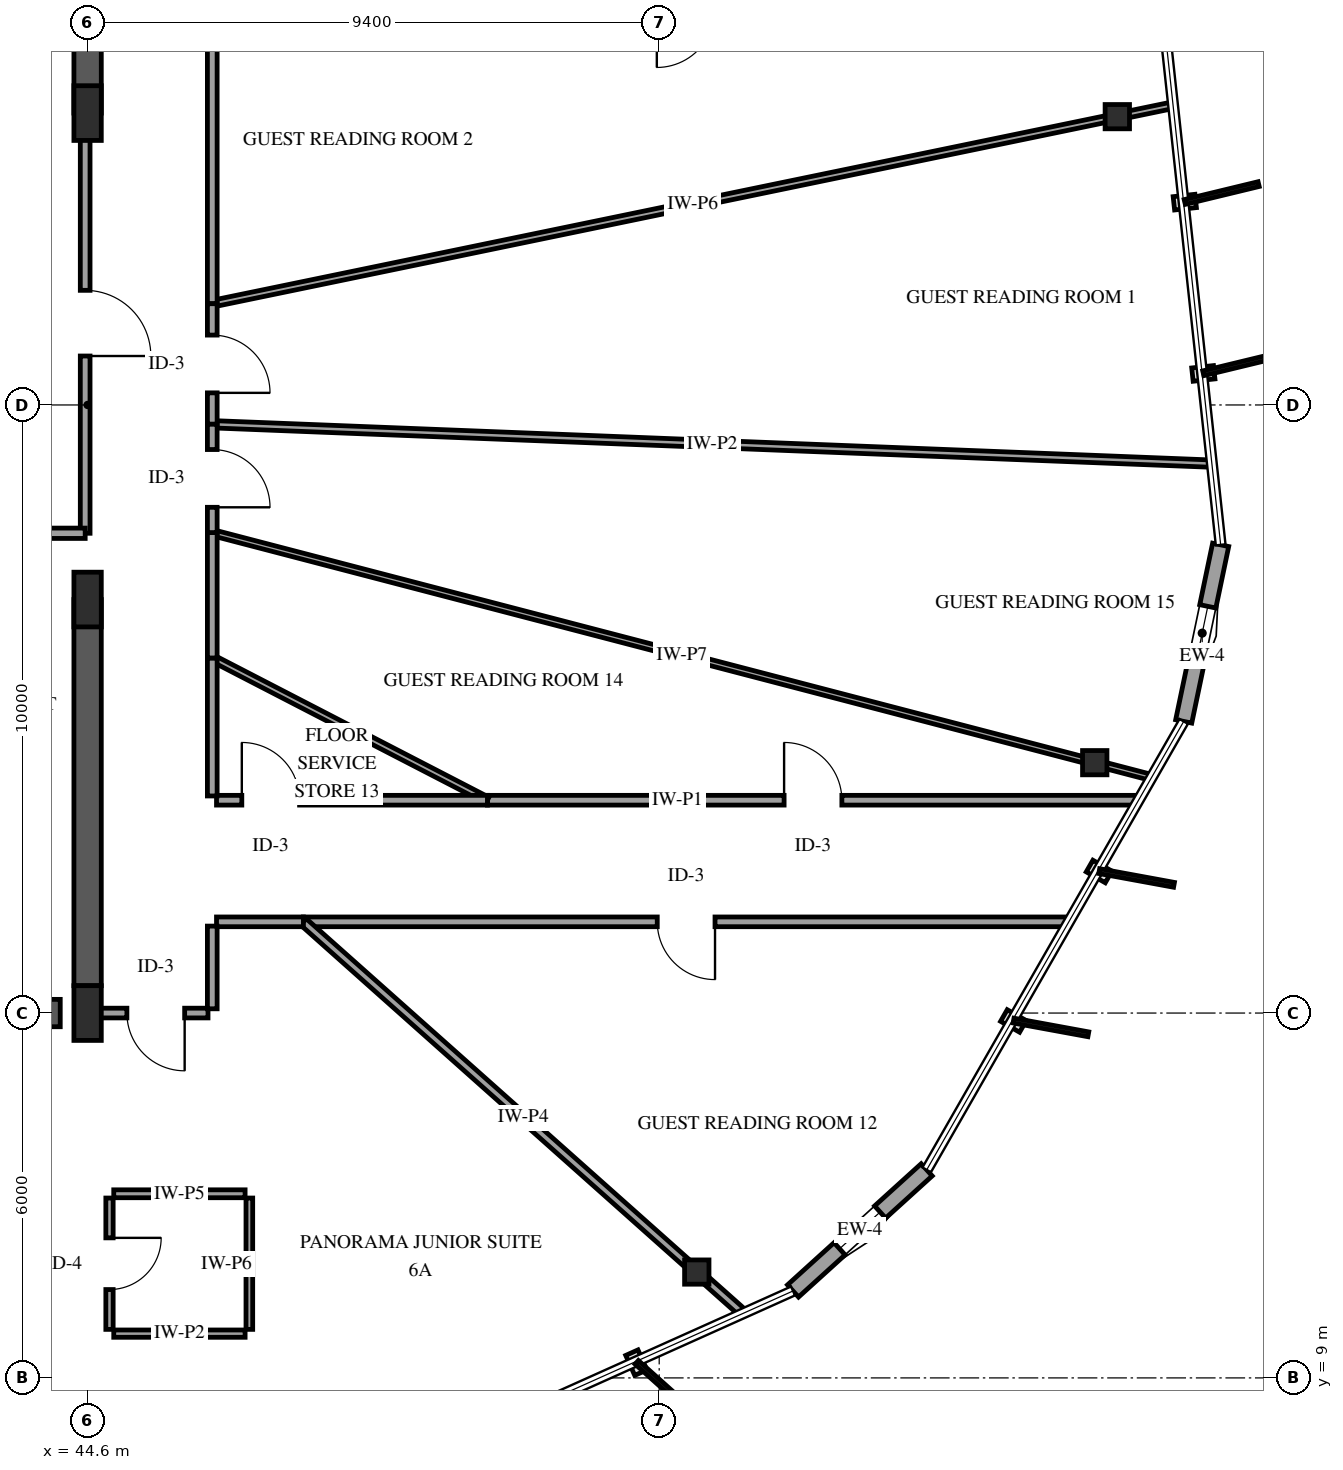
"""IFC4 building model, lengths in metres.
Left out: names, types, materials, properties, quantities, classifications, styles, units other than length and angle.
Written with IfcOpenShell. Run it as: python <this file> out.ifc"""

import sys

from ifc_helpers import new_model, si_unit, direction, frame, frame_2d, origin, origin_2d, place, context, subcontext, project, spatial, rectangle, i_section, extrude, element, fill, save


model = new_model("IFC4")
c1 = context("Model", 3, precision=1e-05, world=origin(), true_north=direction((0.0, 1.0)))
c2 = subcontext(c1, "Body", "Model", "MODEL_VIEW")
j1 = project(units=[si_unit("LENGTHUNIT", "METRE"), si_unit("PLANEANGLEUNIT", "RADIAN")], contexts=[c1])
p1 = place(None, origin())
s1 = spatial("IfcSite", under=j1, at=p1, CompositionType="ELEMENT")
p2 = place(p1, origin())
s2 = spatial("IfcBuilding", under=s1, at=p2, CompositionType="ELEMENT")
p3 = place(p2, frame((0.0, 0.0, 253.75)))
s3 = spatial("IfcBuildingStorey", under=s2, at=p3, CompositionType="ELEMENT", Elevation=253.75)
p4 = place(p3, frame((41.3, 15.0, 0.0), z_axis=(0.0, 0.0, 1.0), x_axis=(1.0, 0.0, 0.0)))
e1 = element("IfcWall", 1, at=p4, inside=s3, PredefinedType="SHEAR", context=c2, shape_type="SweptSolid", body=[
    extrude(rectangle(XDim=2.85, YDim=0.45, at=frame_2d((1.425, 0.0))), origin(), (0.0, 0.0, 1.0), 3.75),
])
p5 = place(p3, frame((44.6, 15.45, 0.0), z_axis=(0.0, 0.0, 1.0), x_axis=(0.0, 1.0, 0.0)))
e2 = element("IfcWall", 2, at=p5, inside=s3, PredefinedType="SHEAR", context=c2, shape_type="SweptSolid", body=[
    extrude(rectangle(XDim=6.35, YDim=0.45, at=frame_2d((3.175, 0.0))), origin(), (0.0, 0.0, 1.0), 3.75),
])
p6 = place(p3, frame((44.6, 29.8, 0.0), z_axis=(0.0, 0.0, 1.0), x_axis=(0.0, 1.0, 0.0)))
e3 = element("IfcWall", 3, at=p6, inside=s3, PredefinedType="SHEAR", context=c2, shape_type="SweptSolid", body=[
    extrude(rectangle(XDim=4.75, YDim=0.45, at=frame_2d((2.375, 0.0))), origin(), (0.0, 0.0, 1.0), 3.75),
])
for number, where, z_axis, x_axis in (
    (4, (44.6, 15.0, 0.0), (0.0, 0.0, 1.0), (1.0, 0.0, 0.0)),
    (5, (44.6, 21.8, 0.0), (0.0, 0.0, 1.0), (1.0, 0.0, 0.0)),
    (6, (44.6, 29.8, 0.0), (0.0, 0.0, 1.0), (1.0, 0.0, 0.0)),
):
    element("IfcColumn", number, at=place(p3, frame(where, z_axis=z_axis, x_axis=x_axis)), inside=s3, PredefinedType="PILASTER", context=c2, shape_type="SweptSolid", body=[
        extrude(rectangle(XDim=0.45, YDim=0.9, at=origin_2d()), origin(), (0.0, 0.0, 1.0), 3.75),
    ])
for number, where, z_axis, x_axis in (
    (7, (61.534, 29.741, 0.0), (0.0, 0.0, 1.0), (1.0, 0.0, 0.0)),
    (8, (54.618, 10.74, 0.0), (0.0, 0.0, 1.0), (1.0, 0.0, 0.0)),
    (9, (61.163, 19.117, 0.0), (0.0, 0.0, 1.0), (1.0, 0.0, 0.0)),
):
    element("IfcColumn", number, at=place(p3, frame(where, z_axis=z_axis, x_axis=x_axis)), inside=s3, PredefinedType="COLUMN", context=c2, shape_type="SweptSolid", body=[
        extrude(i_section(OverallWidth=0.401, OverallDepth=0.399, WebThickness=0.025, FlangeThickness=0.04, FilletRadius=0.038, at=origin_2d()), origin(), (0.0, 0.0, 1.0), 3.75),
    ])
p7 = place(p3, frame((56.201, 10.43, 0.0), z_axis=(0.0, 0.0, 1.0), x_axis=(0.741022782564, 0.671479884822, 0.0)))
e10 = element("IfcWall", 10, at=p7, inside=s3, PredefinedType="SOLIDWALL", context=c2, shape_type="SweptSolid", body=[
    extrude(rectangle(XDim=2.967, YDim=0.27, at=frame_2d((1.483, 0.0))), origin(), (0.0, 0.0, 1.0), 2.829),
])
p8 = place(p7, frame((1.033, 0.0, 0.75)))
e11 = element("IfcOpeningElement", 11, at=p8, cuts=e10, PredefinedType="OPENING", context=c2, shape_type="SweptSolid", body=[
    extrude(rectangle(XDim=0.9, YDim=1.5, at=frame_2d((0.45, 0.75))), frame((0.0, 0.145, 0.0), z_axis=(0.0, -1.0, 0.0), x_axis=(1.0, 0.0, 0.0)), (0.0, 0.0, 1.0), 0.29),
])
p9 = place(p3, frame((62.626, 19.796, 0.0), z_axis=(0.0, 0.0, 1.0), x_axis=(0.204828317867, 0.978797915915, 0.0)))
e12 = element("IfcWall", 12, at=p9, inside=s3, PredefinedType="SOLIDWALL", context=c2, shape_type="SweptSolid", body=[
    extrude(rectangle(XDim=2.967, YDim=0.27, at=frame_2d((1.483, 0.0))), origin(), (0.0, 0.0, 1.0), 2.829),
])
p10 = place(p9, frame((1.033, 0.0, 0.75)))
e13 = element("IfcOpeningElement", 13, at=p10, cuts=e12, PredefinedType="OPENING", context=c2, shape_type="SweptSolid", body=[
    extrude(rectangle(XDim=0.9, YDim=1.5, at=frame_2d((0.45, 0.75))), frame((0.0, 0.145, 0.0), z_axis=(0.0, -1.0, 0.0), x_axis=(1.0, 0.0, 0.0)), (0.0, 0.0, 1.0), 0.29),
])
p11 = place(p3, frame((63.089, 24.035, 0.0), z_axis=(0.0, 0.0, 1.0), x_axis=(-0.999223553945, 0.039399102038, 0.0)))
e14 = element("IfcWall", 14, at=p11, inside=s3, PredefinedType="PARTITIONING", context=c2, shape_type="SweptSolid", body=[
    extrude(rectangle(XDim=16.452, YDim=0.12, at=frame_2d((8.226, 0.0))), origin(), (0.0, 0.0, 1.0), 3.45),
])
p12 = place(p3, frame((46.65, 26.665, 0.0), z_axis=(0.0, 0.0, 1.0), x_axis=(0.979310600043, 0.202362913212, 0.0)))
e15 = element("IfcWall", 15, at=p12, inside=s3, PredefinedType="PARTITIONING", context=c2, shape_type="SweptSolid", body=[
    extrude(rectangle(XDim=16.134, YDim=0.11, at=frame_2d((8.067, 0.0))), origin(), (0.0, 0.0, 1.0), 2.745),
])
p13 = place(p3, frame((46.65, 22.901, 0.0), z_axis=(0.0, 0.0, 1.0), x_axis=(0.967645201087, -0.252314812909, 0.0)))
e16 = element("IfcWall", 16, at=p13, inside=s3, PredefinedType="PARTITIONING", context=c2, shape_type="SweptSolid", body=[
    extrude(rectangle(XDim=15.964, YDim=0.1, at=frame_2d((7.982, 0.0))), origin(), (0.0, 0.0, 1.0), 3.45),
])
p14 = place(p3, frame((60.737, 16.5, 0.0), z_axis=(0.0, 0.0, 1.0), x_axis=(-1.0, 0.0, 0.0)))
e17 = element("IfcWall", 17, at=p14, inside=s3, PredefinedType="PARTITIONING", context=c2, shape_type="SweptSolid", body=[
    extrude(rectangle(XDim=12.588, YDim=0.16, at=frame_2d((6.294, 0.0))), origin(), (0.0, 0.0, 1.0), 3.45),
])
p15 = place(p14, frame((5.819, 0.0, 0.0)))
e18 = element("IfcOpeningElement", 18, at=p15, cuts=e17, PredefinedType="OPENING", context=c2, shape_type="SweptSolid", body=[
    extrude(rectangle(XDim=0.95, YDim=2.15, at=frame_2d((0.475, 1.075))), frame((0.0, 0.09, 0.0), z_axis=(0.0, -1.0, 0.0), x_axis=(1.0, 0.0, 0.0)), (0.0, 0.0, 1.0), 0.18),
])
p16 = place(p3, frame((51.175, 18.5, 0.0), z_axis=(0.0, 0.0, 1.0), x_axis=(1.0, 0.0, 0.0)))
e19 = element("IfcWall", 19, at=p16, inside=s3, PredefinedType="PARTITIONING", context=c2, shape_type="SweptSolid", body=[
    extrude(rectangle(XDim=10.708, YDim=0.16, at=frame_2d((5.354, 0.0))), origin(), (0.0, 0.0, 1.0), 2.745),
])
p17 = place(p16, frame((4.879, 0.0, 0.0)))
e20 = element("IfcOpeningElement", 20, at=p17, cuts=e19, PredefinedType="OPENING", context=c2, shape_type="SweptSolid", body=[
    extrude(rectangle(XDim=0.95, YDim=2.15, at=frame_2d((0.475, 1.075))), frame((0.0, 0.09, 0.0), z_axis=(0.0, -1.0, 0.0), x_axis=(1.0, 0.0, 0.0)), (0.0, 0.0, 1.0), 0.18),
])
p18 = place(p3, frame((48.149, 16.5, 0.0), z_axis=(0.0, 0.0, 1.0), x_axis=(0.74692778728, -0.664905166613, 0.0)))
e21 = element("IfcWall", 21, at=p18, inside=s3, PredefinedType="PARTITIONING", context=c2, shape_type="SweptSolid", body=[
    extrude(rectangle(XDim=9.683, YDim=0.14, at=frame_2d((4.841, 0.0))), origin(), (0.0, 0.0, 1.0), 2.828),
])
p19 = place(p3, frame((44.56, 29.8, 0.0), z_axis=(0.0, 0.0, 1.0), x_axis=(0.0, -1.0, 0.0)))
e22 = element("IfcWall", 22, at=p19, inside=s3, PredefinedType="PARTITIONING", context=c2, shape_type="SweptSolid", body=[
    extrude(rectangle(XDim=6.91, YDim=0.16, at=frame_2d((3.455, 0.0))), origin(), (0.0, 0.0, 1.0), 2.49),
])
p20 = place(p19, frame((2.915, 0.0, 0.0)))
e23 = element("IfcOpeningElement", 23, at=p20, cuts=e22, PredefinedType="OPENING", context=c2, shape_type="SweptSolid", body=[
    extrude(rectangle(XDim=1.08, YDim=2.15, at=frame_2d((0.54, 1.075))), frame((0.0, 0.09, 0.0), z_axis=(0.0, -1.0, 0.0), x_axis=(1.0, 0.0, 0.0)), (0.0, 0.0, 1.0), 0.18),
])
p21 = place(p3, frame((46.65, 20.839, 0.0), z_axis=(0.0, 0.0, 1.0), x_axis=(0.888336308272, -0.459193427006, 0.0)))
e24 = element("IfcWall", 24, at=p21, inside=s3, PredefinedType="PARTITIONING", context=c2, shape_type="SweptSolid", body=[
    extrude(rectangle(XDim=5.094, YDim=0.11, at=frame_2d((2.547, 0.0))), origin(), (0.0, 0.0, 1.0), 3.45),
])
p22 = place(p3, frame((46.65, 31.5, 0.0), z_axis=(0.0, 0.0, 1.0), x_axis=(0.0, -1.0, 0.0)))
e25 = element("IfcWall", 25, at=p22, inside=s3, PredefinedType="PARTITIONING", context=c2, shape_type="SweptSolid", body=[
    extrude(rectangle(XDim=4.835, YDim=0.16, at=frame_2d((2.417, 0.0))), origin(), (0.0, 0.0, 1.0), 3.45),
])
p23 = place(p3, frame((46.72, 18.5, 0.0), z_axis=(0.0, 0.0, 1.0), x_axis=(1.0, 0.0, 0.0)))
e26 = element("IfcWall", 26, at=p23, inside=s3, PredefinedType="PARTITIONING", context=c2, shape_type="SweptSolid", body=[
    extrude(rectangle(XDim=4.455, YDim=0.16, at=frame_2d((2.228, 0.0))), origin(), (0.0, 0.0, 1.0), 2.745),
])
p24 = place(p23, frame((0.416, 0.0, 0.0)))
e27 = element("IfcOpeningElement", 27, at=p24, cuts=e26, PredefinedType="OPENING", context=c2, shape_type="SweptSolid", body=[
    extrude(rectangle(XDim=0.95, YDim=2.15, at=frame_2d((0.475, 1.075))), frame((0.0, 0.09, 0.0), z_axis=(0.0, -1.0, 0.0), x_axis=(1.0, 0.0, 0.0)), (0.0, 0.0, 1.0), 0.18),
])
p25 = place(p3, frame((41.24, 22.89, 0.0), z_axis=(0.0, 0.0, 1.0), x_axis=(1.0, 0.0, 0.0)))
e28 = element("IfcWall", 28, at=p25, inside=s3, PredefinedType="PARTITIONING", context=c2, shape_type="SweptSolid", body=[
    extrude(rectangle(XDim=3.32, YDim=0.17, at=frame_2d((1.66, 0.0))), origin(), (0.0, 0.0, 1.0), 3.45),
])
p26 = place(p25, frame((1.12, 0.0, 0.0)))
e29 = element("IfcOpeningElement", 29, at=p26, cuts=e28, PredefinedType="OPENING", context=c2, shape_type="SweptSolid", body=[
    extrude(rectangle(XDim=1.08, YDim=2.15, at=frame_2d((0.54, 1.075))), frame((0.0, 0.095, 0.0), z_axis=(0.0, -1.0, 0.0), x_axis=(1.0, 0.0, 0.0)), (0.0, 0.0, 1.0), 0.19),
])
p27 = place(p3, frame((46.65, 20.839, 0.0), z_axis=(0.0, 0.0, 1.0), x_axis=(0.0, -1.0, 0.0)))
e30 = element("IfcWall", 30, at=p27, inside=s3, PredefinedType="PARTITIONING", context=c2, shape_type="SweptSolid", body=[
    extrude(rectangle(XDim=2.269, YDim=0.16, at=frame_2d((1.135, 0.0))), origin(), (0.0, 0.0, 1.0), 3.45),
])
p28 = place(p3, frame((44.96, 11.958, 0.0), z_axis=(0.0, 0.0, 1.0), x_axis=(0.0, -1.0, 0.0)))
e31 = element("IfcWall", 31, at=p28, inside=s3, PredefinedType="PARTITIONING", context=c2, shape_type="SweptSolid", body=[
    extrude(rectangle(XDim=2.16, YDim=0.12, at=frame_2d((1.08, 0.0))), origin(), (0.0, 0.0, 1.0), 2.828),
])
p29 = place(p28, frame((0.655, 0.0, 0.0)))
e32 = element("IfcOpeningElement", 32, at=p29, cuts=e31, PredefinedType="OPENING", context=c2, shape_type="SweptSolid", body=[
    extrude(rectangle(XDim=0.85, YDim=2.1, at=frame_2d((0.425, 1.05))), frame((0.0, 0.07, 0.0), z_axis=(0.0, -1.0, 0.0), x_axis=(1.0, 0.0, 0.0)), (0.0, 0.0, 1.0), 0.14),
])
p30 = place(p3, frame((47.26, 9.798, 0.0), z_axis=(0.0, 0.0, 1.0), x_axis=(0.0, 1.0, 0.0)))
e33 = element("IfcWall", 33, at=p30, inside=s3, PredefinedType="PARTITIONING", context=c2, shape_type="SweptSolid", body=[
    extrude(rectangle(XDim=2.16, YDim=0.11, at=frame_2d((1.08, 0.0))), origin(), (0.0, 0.0, 1.0), 3.45),
])
p31 = place(p3, frame((47.19, 12.028, 0.0), z_axis=(0.0, 0.0, 1.0), x_axis=(-1.0, 0.0, 0.0)))
e34 = element("IfcWall", 34, at=p31, inside=s3, PredefinedType="PARTITIONING", context=c2, shape_type="SweptSolid", body=[
    extrude(rectangle(XDim=2.16, YDim=0.13, at=frame_2d((1.08, 0.0))), origin(), (0.0, 0.0, 1.0), 3.45),
])
p32 = place(p3, frame((45.03, 9.728, 0.0), z_axis=(0.0, 0.0, 1.0), x_axis=(1.0, 0.0, 0.0)))
e35 = element("IfcWall", 35, at=p32, inside=s3, PredefinedType="PARTITIONING", context=c2, shape_type="SweptSolid", body=[
    extrude(rectangle(XDim=2.16, YDim=0.12, at=frame_2d((1.08, 0.0))), origin(), (0.0, 0.0, 1.0), 3.45),
])
p33 = place(p3, frame((46.65, 22.901, 0.0), z_axis=(0.0, 0.0, 1.0), x_axis=(0.0, -1.0, 0.0)))
e36 = element("IfcWall", 36, at=p33, inside=s3, PredefinedType="PARTITIONING", context=c2, shape_type="SweptSolid", body=[
    extrude(rectangle(XDim=2.062, YDim=0.16, at=frame_2d((1.031, 0.0))), origin(), (0.0, 0.0, 1.0), 3.45),
])
p34 = place(p3, frame((46.65, 26.665, 0.0), z_axis=(0.0, 0.0, 1.0), x_axis=(0.0, -1.0, 0.0)))
e37 = element("IfcWall", 37, at=p34, inside=s3, PredefinedType="PARTITIONING", context=c2, shape_type="SweptSolid", body=[
    extrude(rectangle(XDim=1.982, YDim=0.16, at=frame_2d((0.991, 0.0))), origin(), (0.0, 0.0, 1.0), 3.45),
])
p35 = place(p34, frame((0.516, 0.0, 0.0)))
e38 = element("IfcOpeningElement", 38, at=p35, cuts=e37, PredefinedType="OPENING", context=c2, shape_type="SweptSolid", body=[
    extrude(rectangle(XDim=0.95, YDim=2.15, at=frame_2d((0.475, 1.075))), frame((0.0, 0.09, 0.0), z_axis=(0.0, -1.0, 0.0), x_axis=(1.0, 0.0, 0.0)), (0.0, 0.0, 1.0), 0.18),
])
p36 = place(p3, frame((46.58, 15.0, 0.0), z_axis=(0.0, 0.0, 1.0), x_axis=(-1.0, 0.0, 0.0)))
e39 = element("IfcWall", 39, at=p36, inside=s3, PredefinedType="PARTITIONING", context=c2, shape_type="SweptSolid", body=[
    extrude(rectangle(XDim=1.91, YDim=0.16, at=frame_2d((0.955, 0.0))), origin(), (0.0, 0.0, 1.0), 3.45),
])
p37 = place(p36, frame((0.384, 0.0, 0.0)))
e40 = element("IfcOpeningElement", 40, at=p37, cuts=e39, PredefinedType="OPENING", context=c2, shape_type="SweptSolid", body=[
    extrude(rectangle(XDim=0.95, YDim=2.15, at=frame_2d((0.475, 1.075))), frame((0.0, 0.09, 0.0), z_axis=(0.0, -1.0, 0.0), x_axis=(1.0, 0.0, 0.0)), (0.0, 0.0, 1.0), 0.18),
])
p38 = place(p3, frame((46.65, 24.683, 0.0), z_axis=(0.0, 0.0, 1.0), x_axis=(0.0, -1.0, 0.0)))
e41 = element("IfcWall", 41, at=p38, inside=s3, PredefinedType="PARTITIONING", context=c2, shape_type="SweptSolid", body=[
    extrude(rectangle(XDim=1.782, YDim=0.16, at=frame_2d((0.891, 0.0))), origin(), (0.0, 0.0, 1.0), 3.45),
])
p39 = place(p38, frame((0.416, 0.0, 0.0)))
e42 = element("IfcOpeningElement", 42, at=p39, cuts=e41, PredefinedType="OPENING", context=c2, shape_type="SweptSolid", body=[
    extrude(rectangle(XDim=0.95, YDim=2.15, at=frame_2d((0.475, 1.075))), frame((0.0, 0.09, 0.0), z_axis=(0.0, -1.0, 0.0), x_axis=(1.0, 0.0, 0.0)), (0.0, 0.0, 1.0), 0.18),
])
p40 = place(p3, frame((48.149, 16.5, 0.0), z_axis=(0.0, 0.0, 1.0), x_axis=(-1.0, 0.0, 0.0)))
e43 = element("IfcWall", 43, at=p40, inside=s3, PredefinedType="PARTITIONING", context=c2, shape_type="SweptSolid", body=[
    extrude(rectangle(XDim=1.429, YDim=0.16, at=frame_2d((0.714, 0.0))), origin(), (0.0, 0.0, 1.0), 3.45),
])
p41 = place(p3, frame((46.65, 16.43, 0.0), z_axis=(0.0, 0.0, 1.0), x_axis=(0.0, -1.0, 0.0)))
e44 = element("IfcWall", 44, at=p41, inside=s3, PredefinedType="PARTITIONING", context=c2, shape_type="SweptSolid", body=[
    extrude(rectangle(XDim=1.36, YDim=0.16, at=frame_2d((0.68, 0.0))), origin(), (0.0, 0.0, 1.0), 3.45),
])
p42 = place(p8, origin())
e45 = element("IfcWindow", 45, at=p42, inside=s3, PartitioningType="SINGLE_PANEL", PredefinedType="WINDOW", context=c2, shape_type="SweptSolid", body=[
    extrude(rectangle(XDim=0.9, YDim=1.5, at=frame_2d((0.45, 0.75))), frame((0.0, 0.03, 0.0), z_axis=(0.0, -1.0, 0.0), x_axis=(1.0, 0.0, 0.0)), (0.0, 0.0, 1.0), 0.06),
])
fill(e11, e45)
p43 = place(p10, origin())
e46 = element("IfcWindow", 46, at=p43, inside=s3, PartitioningType="SINGLE_PANEL", PredefinedType="WINDOW", context=c2, shape_type="SweptSolid", body=[
    extrude(rectangle(XDim=0.9, YDim=1.5, at=frame_2d((0.45, 0.75))), frame((0.0, 0.03, 0.0), z_axis=(0.0, -1.0, 0.0), x_axis=(1.0, 0.0, 0.0)), (0.0, 0.0, 1.0), 0.06),
])
fill(e13, e46)
p44 = place(p15, origin())
e47 = element("IfcDoor", 47, at=p44, inside=s3, OperationType="SINGLE_SWING_LEFT", PredefinedType="DOOR", context=c2, shape_type="SweptSolid", body=[
    extrude(rectangle(XDim=0.95, YDim=2.15, at=frame_2d((0.475, 1.075))), frame((0.0, 0.025, 0.0), z_axis=(0.0, -1.0, 0.0), x_axis=(1.0, 0.0, 0.0)), (0.0, 0.0, 1.0), 0.05),
])
fill(e18, e47)
p45 = place(p17, origin())
e48 = element("IfcDoor", 48, at=p45, inside=s3, OperationType="SINGLE_SWING_LEFT", PredefinedType="DOOR", context=c2, shape_type="SweptSolid", body=[
    extrude(rectangle(XDim=0.95, YDim=2.15, at=frame_2d((0.475, 1.075))), frame((0.0, 0.025, 0.0), z_axis=(0.0, -1.0, 0.0), x_axis=(1.0, 0.0, 0.0)), (0.0, 0.0, 1.0), 0.05),
])
fill(e20, e48)
p46 = place(p20, origin())
e49 = element("IfcDoor", 49, at=p46, inside=s3, OperationType="SINGLE_SWING_RIGHT", PredefinedType="DOOR", context=c2, shape_type="SweptSolid", body=[
    extrude(rectangle(XDim=1.08, YDim=2.15, at=frame_2d((0.54, 1.075))), frame((0.0, 0.025, 0.0), z_axis=(0.0, -1.0, 0.0), x_axis=(1.0, 0.0, 0.0)), (0.0, 0.0, 1.0), 0.05),
])
fill(e23, e49)
p47 = place(p24, origin())
e50 = element("IfcDoor", 50, at=p47, inside=s3, OperationType="SINGLE_SWING_LEFT", PredefinedType="DOOR", context=c2, shape_type="SweptSolid", body=[
    extrude(rectangle(XDim=0.95, YDim=2.15, at=frame_2d((0.475, 1.075))), frame((0.0, 0.025, 0.0), z_axis=(0.0, -1.0, 0.0), x_axis=(1.0, 0.0, 0.0)), (0.0, 0.0, 1.0), 0.05),
])
fill(e27, e50)
p48 = place(p29, origin())
e51 = element("IfcDoor", 51, at=p48, inside=s3, OperationType="SINGLE_SWING_LEFT", PredefinedType="DOOR", context=c2, shape_type="SweptSolid", body=[
    extrude(rectangle(XDim=0.85, YDim=2.1, at=frame_2d((0.425, 1.05))), frame((0.0, 0.025, 0.0), z_axis=(0.0, -1.0, 0.0), x_axis=(1.0, 0.0, 0.0)), (0.0, 0.0, 1.0), 0.05),
])
fill(e32, e51)
p49 = place(p35, origin())
e52 = element("IfcDoor", 52, at=p49, inside=s3, OperationType="SINGLE_SWING_RIGHT", PredefinedType="DOOR", context=c2, shape_type="SweptSolid", body=[
    extrude(rectangle(XDim=0.95, YDim=2.15, at=frame_2d((0.475, 1.075))), frame((0.0, 0.025, 0.0), z_axis=(0.0, -1.0, 0.0), x_axis=(1.0, 0.0, 0.0)), (0.0, 0.0, 1.0), 0.05),
])
fill(e38, e52)
p50 = place(p37, origin())
e53 = element("IfcDoor", 53, at=p50, inside=s3, OperationType="SINGLE_SWING_LEFT", PredefinedType="DOOR", context=c2, shape_type="SweptSolid", body=[
    extrude(rectangle(XDim=0.95, YDim=2.15, at=frame_2d((0.475, 1.075))), frame((0.0, 0.025, 0.0), z_axis=(0.0, -1.0, 0.0), x_axis=(1.0, 0.0, 0.0)), (0.0, 0.0, 1.0), 0.05),
])
fill(e40, e53)
p51 = place(p39, origin())
e54 = element("IfcDoor", 54, at=p51, inside=s3, OperationType="SINGLE_SWING_RIGHT", PredefinedType="DOOR", context=c2, shape_type="SweptSolid", body=[
    extrude(rectangle(XDim=0.95, YDim=2.15, at=frame_2d((0.475, 1.075))), frame((0.0, 0.025, 0.0), z_axis=(0.0, -1.0, 0.0), x_axis=(1.0, 0.0, 0.0)), (0.0, 0.0, 1.0), 0.05),
])
fill(e42, e54)
save(model, sys.argv[1])
